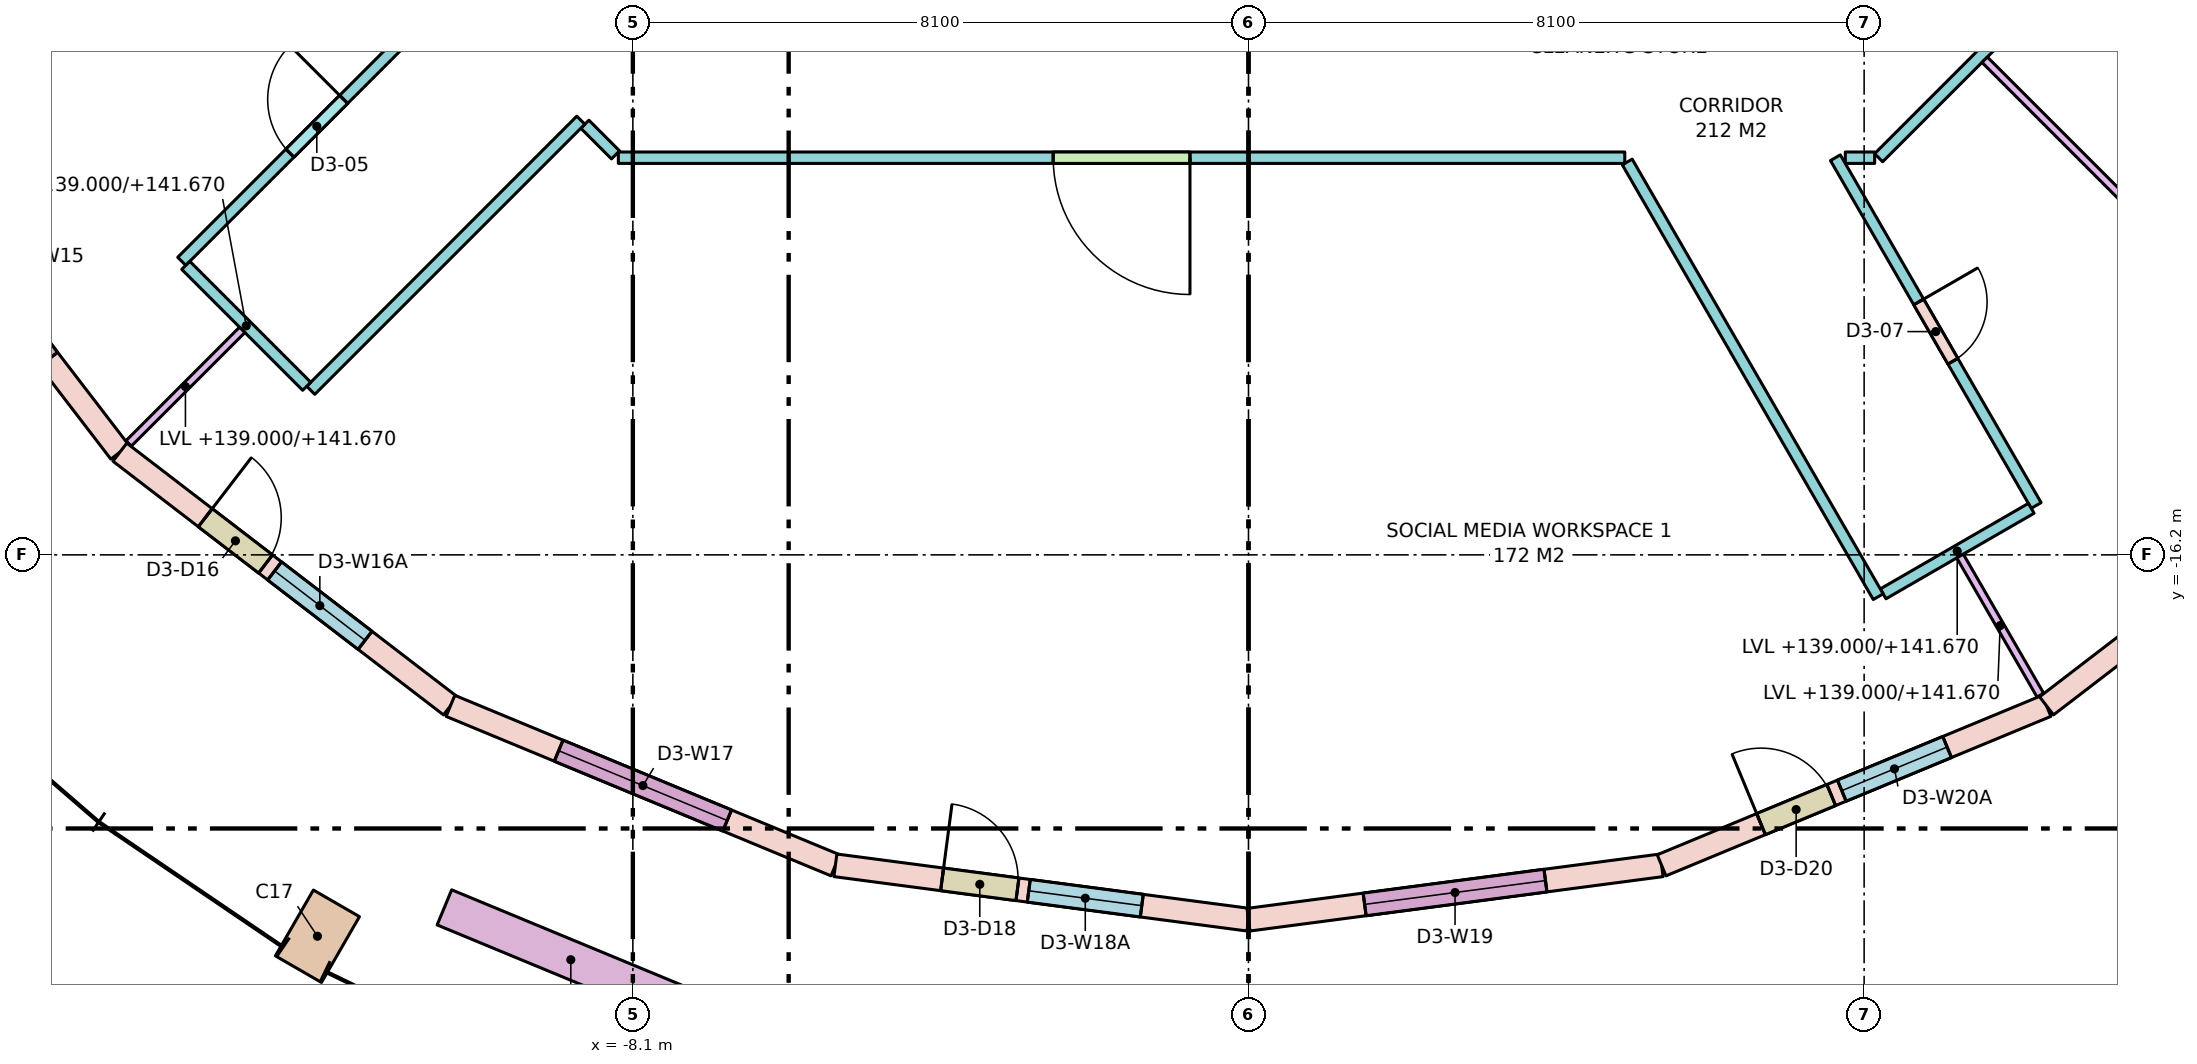
"""IFC4 building model, lengths in metres.
Left out: names, types, materials, properties, quantities, classifications, styles, units other than length and angle.
Written with IfcOpenShell. Run it as: python <this file> out.ifc"""

import sys

from ifc_helpers import new_model, si_unit, direction, frame, frame_2d, origin, origin_2d, place, context, subcontext, project, spatial, rectangle, extrude, element, fill, save


model = new_model("IFC4")
c1 = context("Model", 3, precision=1e-05, world=origin(), true_north=direction((0.0, 1.0)))
c2 = subcontext(c1, "Body", "Model", "MODEL_VIEW")
j1 = project(units=[si_unit("LENGTHUNIT", "METRE"), si_unit("PLANEANGLEUNIT", "RADIAN")], contexts=[c1])
p1 = place(None, origin())
s1 = spatial("IfcSite", under=j1, at=p1, CompositionType="ELEMENT")
p2 = place(p1, origin())
s2 = spatial("IfcBuilding", under=s1, at=p2, CompositionType="ELEMENT")
p3 = place(p2, frame((0.0, 0.0, 139.0)))
s3 = spatial("IfcBuildingStorey", under=s2, at=p3, CompositionType="ELEMENT", Elevation=139.0)
p4 = place(p3, frame((-12.25, -21.218, 0.0), z_axis=(0.0, 0.0, 1.0), x_axis=(0.866025403784, -0.5, 0.0)))
e1 = element("IfcColumn", 1, at=p4, inside=s3, PredefinedType="COLUMN", context=c2, shape_type="SweptSolid", body=[
    extrude(rectangle(XDim=0.7, YDim=1.0, at=origin_2d()), origin(), (0.0, 0.0, 1.0), 3.8),
])
p5 = place(p3, frame((-18.187, -10.5, 0.0), z_axis=(0.0, 0.0, 1.0), x_axis=(0.608784891166, -0.793335336593, 0.0)))
e2 = element("IfcWall", 2, at=p5, inside=s3, PredefinedType="STANDARD", context=c2, shape_type="SweptSolid", body=[
    extrude(rectangle(XDim=5.482, YDim=0.3, at=frame_2d((2.741, 0.0))), origin(), (0.0, 0.0, 1.0), 3.52),
])
p6 = place(p5, frame((1.541, 0.0, 0.8)))
e3 = element("IfcOpeningElement", 3, at=p6, cuts=e2, PredefinedType="OPENING", context=c2, shape_type="SweptSolid", body=[
    extrude(rectangle(XDim=2.4, YDim=2.5, at=frame_2d((1.2, 1.25))), frame((0.0, 0.16, 0.0), z_axis=(0.0, -1.0, 0.0), x_axis=(1.0, 0.0, 0.0)), (0.0, 0.0, 1.0), 0.32),
])
p7 = place(p3, frame((-14.849, -14.849, 0.0), z_axis=(0.0, 0.0, 1.0), x_axis=(0.793335336593, -0.608784891166, 0.0)))
e4 = element("IfcWall", 4, at=p7, inside=s3, PredefinedType="STANDARD", context=c2, shape_type="SweptSolid", body=[
    extrude(rectangle(XDim=5.482, YDim=0.3, at=frame_2d((2.741, 0.0))), origin(), (0.0, 0.0, 1.0), 3.52),
])
p8 = place(p7, frame((1.416, 0.0, 0.0)))
e5 = element("IfcOpeningElement", 5, at=p8, cuts=e4, PredefinedType="OPENING", context=c2, shape_type="SweptSolid", body=[
    extrude(rectangle(XDim=1.0, YDim=2.4, at=frame_2d((0.5, 1.2))), frame((0.0, 0.16, 0.0), z_axis=(0.0, -1.0, 0.0), x_axis=(1.0, 0.0, 0.0)), (0.0, 0.0, 1.0), 0.32),
])
p9 = place(p7, frame((2.566, 0.0, 0.8)))
e6 = element("IfcOpeningElement", 6, at=p9, cuts=e4, PredefinedType="OPENING", context=c2, shape_type="SweptSolid", body=[
    extrude(rectangle(XDim=1.5, YDim=2.5, at=frame_2d((0.75, 1.25))), frame((0.0, 0.16, 0.0), z_axis=(0.0, -1.0, 0.0), x_axis=(1.0, 0.0, 0.0)), (0.0, 0.0, 1.0), 0.32),
])
p10 = place(p3, frame((-10.5, -18.187, 0.0), z_axis=(0.0, 0.0, 1.0), x_axis=(0.923877333662, -0.382688740813, 0.0)))
e7 = element("IfcWall", 7, at=p10, inside=s3, PredefinedType="STANDARD", context=c2, shape_type="SweptSolid", body=[
    extrude(rectangle(XDim=5.482, YDim=0.3, at=frame_2d((2.741, 0.0))), origin(), (0.0, 0.0, 1.0), 3.52),
])
p11 = place(p10, frame((1.541, 0.0, 0.8)))
e8 = element("IfcOpeningElement", 8, at=p11, cuts=e7, PredefinedType="OPENING", context=c2, shape_type="SweptSolid", body=[
    extrude(rectangle(XDim=2.4, YDim=2.5, at=frame_2d((1.2, 1.25))), frame((0.0, 0.16, 0.0), z_axis=(0.0, -1.0, 0.0), x_axis=(1.0, 0.0, 0.0)), (0.0, 0.0, 1.0), 0.32),
])
p12 = place(p3, frame((-5.435, -20.284, 0.0), z_axis=(0.0, 0.0, 1.0), x_axis=(0.991444743541, -0.130527087244, 0.0)))
e9 = element("IfcWall", 9, at=p12, inside=s3, PredefinedType="STANDARD", context=c2, shape_type="SweptSolid", body=[
    extrude(rectangle(XDim=5.482, YDim=0.3, at=frame_2d((2.741, 0.0))), origin(), (0.0, 0.0, 1.0), 3.52),
])
p13 = place(p12, frame((1.416, 0.0, 0.0)))
e10 = element("IfcOpeningElement", 10, at=p13, cuts=e9, PredefinedType="OPENING", context=c2, shape_type="SweptSolid", body=[
    extrude(rectangle(XDim=1.0, YDim=2.4, at=frame_2d((0.5, 1.2))), frame((0.0, 0.16, 0.0), z_axis=(0.0, -1.0, 0.0), x_axis=(1.0, 0.0, 0.0)), (0.0, 0.0, 1.0), 0.32),
])
p14 = place(p12, frame((2.566, 0.0, 0.8)))
e11 = element("IfcOpeningElement", 11, at=p14, cuts=e9, PredefinedType="OPENING", context=c2, shape_type="SweptSolid", body=[
    extrude(rectangle(XDim=1.5, YDim=2.5, at=frame_2d((0.75, 1.25))), frame((0.0, 0.16, 0.0), z_axis=(0.0, -1.0, 0.0), x_axis=(1.0, 0.0, 0.0)), (0.0, 0.0, 1.0), 0.32),
])
p15 = place(p3, frame((0.0, -21.0, 0.0), z_axis=(0.0, 0.0, 1.0), x_axis=(0.991444743541, 0.130527087244, 0.0)))
e12 = element("IfcWall", 12, at=p15, inside=s3, PredefinedType="STANDARD", context=c2, shape_type="SweptSolid", body=[
    extrude(rectangle(XDim=5.482, YDim=0.3, at=frame_2d((2.741, 0.0))), origin(), (0.0, 0.0, 1.0), 3.52),
])
p16 = place(p15, frame((1.541, 0.0, 0.8)))
e13 = element("IfcOpeningElement", 13, at=p16, cuts=e12, PredefinedType="OPENING", context=c2, shape_type="SweptSolid", body=[
    extrude(rectangle(XDim=2.4, YDim=2.5, at=frame_2d((1.2, 1.25))), frame((0.0, 0.16, 0.0), z_axis=(0.0, -1.0, 0.0), x_axis=(1.0, 0.0, 0.0)), (0.0, 0.0, 1.0), 0.32),
])
p17 = place(p3, frame((5.435, -20.284, 0.0), z_axis=(0.0, 0.0, 1.0), x_axis=(0.923877333662, 0.382688740813, 0.0)))
e14 = element("IfcWall", 14, at=p17, inside=s3, PredefinedType="STANDARD", context=c2, shape_type="SweptSolid", body=[
    extrude(rectangle(XDim=5.482, YDim=0.3, at=frame_2d((2.741, 0.0))), origin(), (0.0, 0.0, 1.0), 3.52),
])
p18 = place(p17, frame((1.416, 0.0, 0.0)))
e15 = element("IfcOpeningElement", 15, at=p18, cuts=e14, PredefinedType="OPENING", context=c2, shape_type="SweptSolid", body=[
    extrude(rectangle(XDim=1.0, YDim=2.4, at=frame_2d((0.5, 1.2))), frame((0.0, 0.16, 0.0), z_axis=(0.0, -1.0, 0.0), x_axis=(1.0, 0.0, 0.0)), (0.0, 0.0, 1.0), 0.32),
])
p19 = place(p17, frame((2.566, 0.0, 0.8)))
e16 = element("IfcOpeningElement", 16, at=p19, cuts=e14, PredefinedType="OPENING", context=c2, shape_type="SweptSolid", body=[
    extrude(rectangle(XDim=1.5, YDim=2.5, at=frame_2d((0.75, 1.25))), frame((0.0, 0.16, 0.0), z_axis=(0.0, -1.0, 0.0), x_axis=(1.0, 0.0, 0.0)), (0.0, 0.0, 1.0), 0.32),
])
p20 = place(p3, frame((10.5, -18.187, 0.0), z_axis=(0.0, 0.0, 1.0), x_axis=(0.793335336593, 0.608784891166, 0.0)))
e17 = element("IfcWall", 17, at=p20, inside=s3, PredefinedType="STANDARD", context=c2, shape_type="SweptSolid", body=[
    extrude(rectangle(XDim=5.482, YDim=0.3, at=frame_2d((2.741, 0.0))), origin(), (0.0, 0.0, 1.0), 3.52),
])
p21 = place(p20, frame((1.541, 0.0, 0.8)))
e18 = element("IfcOpeningElement", 18, at=p21, cuts=e17, PredefinedType="OPENING", context=c2, shape_type="SweptSolid", body=[
    extrude(rectangle(XDim=2.4, YDim=2.5, at=frame_2d((1.2, 1.25))), frame((0.0, 0.16, 0.0), z_axis=(0.0, -1.0, 0.0), x_axis=(1.0, 0.0, 0.0)), (0.0, 0.0, 1.0), 0.32),
])
p22 = place(p3, frame((-10.58, -20.838, 0.0), z_axis=(0.0, 0.0, 1.0), x_axis=(0.923909393783, -0.382611332921, 0.0)))
e19 = element("IfcWall", 19, at=p22, inside=s3, PredefinedType="PARAPET", context=c2, shape_type="SweptSolid", body=[
    extrude(rectangle(XDim=3.6, YDim=0.5, at=frame_2d((1.8, 0.0))), origin(), (0.0, 0.0, 1.0), 0.9),
])
p23 = place(p3, frame((-14.035, -12.338, 0.0), z_axis=(0.0, 0.0, 1.0), x_axis=(0.707106781187, 0.707106781187, 0.0)))
e20 = element("IfcWall", 20, at=p23, inside=s3, PredefinedType="PARTITIONING", context=c2, shape_type="SweptSolid", body=[
    extrude(rectangle(XDim=5.026, YDim=0.15, at=frame_2d((2.513, 0.0))), origin(), (0.0, 0.0, 1.0), 3.52),
])
p24 = place(p23, frame((2.013, 0.0, 0.0)))
e21 = element("IfcOpeningElement", 21, at=p24, cuts=e20, PredefinedType="OPENING", context=c2, shape_type="SweptSolid", body=[
    extrude(rectangle(XDim=1.0, YDim=2.1, at=frame_2d((0.5, 1.05))), frame((0.0, 0.085, 0.0), z_axis=(0.0, -1.0, 0.0), x_axis=(1.0, 0.0, 0.0)), (0.0, 0.0, 1.0), 0.17),
])
p25 = place(p3, frame((12.938, -6.328, 0.0), z_axis=(0.0, 0.0, 1.0), x_axis=(-0.707088206597, -0.707125355289, 0.0)))
e22 = element("IfcWall", 22, at=p25, inside=s3, PredefinedType="PARTITIONING", context=c2, shape_type="SweptSolid", body=[
    extrude(rectangle(XDim=6.572, YDim=0.15, at=frame_2d((3.286, 0.0))), origin(), (0.0, 0.0, 1.0), 2.67),
])
p26 = place(p25, frame((2.398, 0.0, 0.0)))
e23 = element("IfcOpeningElement", 23, at=p26, cuts=e22, PredefinedType="OPENING", context=c2, shape_type="SweptSolid", body=[
    extrude(rectangle(XDim=0.9, YDim=2.1, at=frame_2d((0.45, 1.05))), frame((0.0, 0.085, 0.0), z_axis=(0.0, -1.0, 0.0), x_axis=(1.0, 0.0, 0.0)), (0.0, 0.0, 1.0), 0.17),
])
p27 = place(p3, frame((8.238, -10.975, 0.0), z_axis=(0.0, 0.0, 1.0), x_axis=(-1.0, 0.0, 0.0)))
e24 = element("IfcWall", 24, at=p27, inside=s3, PredefinedType="PARTITIONING", context=c2, shape_type="SweptSolid", body=[
    extrude(rectangle(XDim=0.386, YDim=0.15, at=frame_2d((0.193, 0.0))), origin(), (0.0, 0.0, 1.0), 3.52),
])
p28 = place(p3, frame((7.722, -10.975, 0.0), z_axis=(0.0, 0.0, 1.0), x_axis=(0.499981143329, -0.866036290415, 0.0)))
e25 = element("IfcWall", 25, at=p28, inside=s3, PredefinedType="PARTITIONING", context=c2, shape_type="SweptSolid", body=[
    extrude(rectangle(XDim=5.283, YDim=0.15, at=frame_2d((2.642, 0.0))), origin(), (0.0, 0.0, 1.0), 3.52),
])
p29 = place(p28, frame((2.191, 0.0, 0.0)))
e26 = element("IfcOpeningElement", 26, at=p29, cuts=e25, PredefinedType="OPENING", context=c2, shape_type="SweptSolid", body=[
    extrude(rectangle(XDim=0.9, YDim=2.1, at=frame_2d((0.45, 1.05))), frame((0.0, 0.085, 0.0), z_axis=(0.0, -1.0, 0.0), x_axis=(1.0, 0.0, 0.0)), (0.0, 0.0, 1.0), 0.17),
])
p30 = place(p3, frame((10.299, -15.588, 0.0), z_axis=(0.0, 0.0, 1.0), x_axis=(-0.866017533419, -0.500013631625, 0.0)))
e27 = element("IfcWall", 27, at=p30, inside=s3, PredefinedType="PARTITIONING", context=c2, shape_type="SweptSolid", body=[
    extrude(rectangle(XDim=2.25, YDim=0.15, at=frame_2d((1.125, 0.0))), origin(), (0.0, 0.0, 1.0), 2.67),
])
p31 = place(p3, frame((8.285, -16.75, 0.0), z_axis=(0.0, 0.0, 1.0), x_axis=(-0.499988075443, 0.866032288321, 0.0)))
e28 = element("IfcWall", 28, at=p31, inside=s3, PredefinedType="PARTITIONING", context=c2, shape_type="SweptSolid", body=[
    extrude(rectangle(XDim=6.604, YDim=0.15, at=frame_2d((3.302, 0.0))), origin(), (0.0, 0.0, 1.0), 3.52),
])
p32 = place(p3, frame((4.951, -10.975, 0.0), z_axis=(0.0, 0.0, 1.0), x_axis=(-1.0, 0.0, 0.0)))
e29 = element("IfcWall", 29, at=p32, inside=s3, PredefinedType="PARTITIONING", context=c2, shape_type="SweptSolid", body=[
    extrude(rectangle(XDim=13.242, YDim=0.15, at=frame_2d((6.621, 0.0))), origin(), (0.0, 0.0, 1.0), 2.67),
])
p33 = place(p32, frame((5.721, 0.0, 0.0)))
e30 = element("IfcOpeningElement", 30, at=p33, cuts=e29, PredefinedType="OPENING", context=c2, shape_type="SweptSolid", body=[
    extrude(rectangle(XDim=1.8, YDim=2.1, at=frame_2d((0.9, 1.05))), frame((0.0, 0.085, 0.0), z_axis=(0.0, -1.0, 0.0), x_axis=(1.0, 0.0, 0.0)), (0.0, 0.0, 1.0), 0.17),
])
p34 = place(p3, frame((-8.328, -10.938, 0.0), z_axis=(0.0, 0.0, 1.0), x_axis=(-0.707106781187, 0.707106781187, 0.0)))
e31 = element("IfcWall", 31, at=p34, inside=s3, PredefinedType="PARTITIONING", context=c2, shape_type="SweptSolid", body=[
    extrude(rectangle(XDim=0.571, YDim=0.15, at=frame_2d((0.285, 0.0))), origin(), (0.0, 0.0, 1.0), 3.52),
])
p35 = place(p3, frame((-8.784, -10.481, 0.0), z_axis=(0.0, 0.0, 1.0), x_axis=(-0.707106781187, -0.707106781187, 0.0)))
e32 = element("IfcWall", 32, at=p35, inside=s3, PredefinedType="PARTITIONING", context=c2, shape_type="SweptSolid", body=[
    extrude(rectangle(XDim=5.026, YDim=0.15, at=frame_2d((2.513, 0.0))), origin(), (0.0, 0.0, 1.0), 3.52),
])
p36 = place(p3, frame((-12.391, -13.982, 0.0), z_axis=(0.0, 0.0, 1.0), x_axis=(-0.707106781187, 0.707106781187, 0.0)))
e33 = element("IfcWall", 33, at=p36, inside=s3, PredefinedType="PARTITIONING", context=c2, shape_type="SweptSolid", body=[
    extrude(rectangle(XDim=2.25, YDim=0.15, at=frame_2d((1.125, 0.0))), origin(), (0.0, 0.0, 1.0), 2.67),
])
p37 = place(p3, frame((-13.24, -13.24, 0.0), z_axis=(0.0, 0.0, 1.0), x_axis=(-0.707106781187, -0.707106781187, 0.0)))
e34 = element("IfcWall", 34, at=p37, inside=s3, PredefinedType="PARTITIONING", context=c2, shape_type="SweptSolid", body=[
    extrude(rectangle(XDim=2.113, YDim=0.1, at=frame_2d((1.057, 0.0))), origin(), (0.0, 0.0, 1.0), 2.67),
])
p38 = place(p3, frame((9.362, -16.215, 0.0), z_axis=(0.0, 0.0, 1.0), x_axis=(0.500015802937, -0.866016279763, 0.0)))
e35 = element("IfcWall", 35, at=p38, inside=s3, PredefinedType="PARTITIONING", context=c2, shape_type="SweptSolid", body=[
    extrude(rectangle(XDim=2.113, YDim=0.1, at=frame_2d((1.057, 0.0))), origin(), (0.0, 0.0, 1.0), 2.67),
])
p39 = place(p3, frame((9.686, -9.686, 0.0), z_axis=(0.0, 0.0, 1.0), x_axis=(0.707106781187, -0.707106781187, 0.0)))
e36 = element("IfcWall", 36, at=p39, inside=s3, PredefinedType="PARTITIONING", context=c2, shape_type="SweptSolid", body=[
    extrude(rectangle(XDim=7.139, YDim=0.1, at=frame_2d((3.569, 0.0))), origin(), (0.0, 0.0, 1.0), 2.67),
])
p40 = place(p8, origin())
e37 = element("IfcDoor", 37, at=p40, inside=s3, OperationType="SINGLE_SWING_LEFT", PredefinedType="DOOR", context=c2, shape_type="SweptSolid", body=[
    extrude(rectangle(XDim=1.0, YDim=2.4, at=frame_2d((0.5, 1.2))), frame((0.0, 0.025, 0.0), z_axis=(0.0, -1.0, 0.0), x_axis=(1.0, 0.0, 0.0)), (0.0, 0.0, 1.0), 0.05),
])
fill(e5, e37)
p41 = place(p9, origin())
e38 = element("IfcWindow", 38, at=p41, inside=s3, PartitioningType="SINGLE_PANEL", PredefinedType="WINDOW", context=c2, shape_type="SweptSolid", body=[
    extrude(rectangle(XDim=1.5, YDim=2.5, at=frame_2d((0.75, 1.25))), frame((0.0, 0.03, 0.0), z_axis=(0.0, -1.0, 0.0), x_axis=(1.0, 0.0, 0.0)), (0.0, 0.0, 1.0), 0.06),
])
fill(e6, e38)
p42 = place(p11, origin())
e39 = element("IfcWindow", 39, at=p42, inside=s3, PartitioningType="SINGLE_PANEL", PredefinedType="WINDOW", context=c2, shape_type="SweptSolid", body=[
    extrude(rectangle(XDim=2.4, YDim=2.5, at=frame_2d((1.2, 1.25))), frame((0.0, 0.03, 0.0), z_axis=(0.0, -1.0, 0.0), x_axis=(1.0, 0.0, 0.0)), (0.0, 0.0, 1.0), 0.06),
])
fill(e8, e39)
p43 = place(p13, origin())
e40 = element("IfcDoor", 40, at=p43, inside=s3, OperationType="SINGLE_SWING_LEFT", PredefinedType="DOOR", context=c2, shape_type="SweptSolid", body=[
    extrude(rectangle(XDim=1.0, YDim=2.4, at=frame_2d((0.5, 1.2))), frame((0.0, 0.025, 0.0), z_axis=(0.0, -1.0, 0.0), x_axis=(1.0, 0.0, 0.0)), (0.0, 0.0, 1.0), 0.05),
])
fill(e10, e40)
p44 = place(p14, origin())
e41 = element("IfcWindow", 41, at=p44, inside=s3, PartitioningType="SINGLE_PANEL", PredefinedType="WINDOW", context=c2, shape_type="SweptSolid", body=[
    extrude(rectangle(XDim=1.5, YDim=2.5, at=frame_2d((0.75, 1.25))), frame((0.0, 0.03, 0.0), z_axis=(0.0, -1.0, 0.0), x_axis=(1.0, 0.0, 0.0)), (0.0, 0.0, 1.0), 0.06),
])
fill(e11, e41)
p45 = place(p16, origin())
e42 = element("IfcWindow", 42, at=p45, inside=s3, PartitioningType="SINGLE_PANEL", PredefinedType="WINDOW", context=c2, shape_type="SweptSolid", body=[
    extrude(rectangle(XDim=2.4, YDim=2.5, at=frame_2d((1.2, 1.25))), frame((0.0, 0.03, 0.0), z_axis=(0.0, -1.0, 0.0), x_axis=(1.0, 0.0, 0.0)), (0.0, 0.0, 1.0), 0.06),
])
fill(e13, e42)
p46 = place(p18, origin())
e43 = element("IfcDoor", 43, at=p46, inside=s3, OperationType="SINGLE_SWING_LEFT", PredefinedType="DOOR", context=c2, shape_type="SweptSolid", body=[
    extrude(rectangle(XDim=1.0, YDim=2.4, at=frame_2d((0.5, 1.2))), frame((0.0, 0.025, 0.0), z_axis=(0.0, -1.0, 0.0), x_axis=(1.0, 0.0, 0.0)), (0.0, 0.0, 1.0), 0.05),
])
fill(e15, e43)
p47 = place(p19, origin())
e44 = element("IfcWindow", 44, at=p47, inside=s3, PartitioningType="SINGLE_PANEL", PredefinedType="WINDOW", context=c2, shape_type="SweptSolid", body=[
    extrude(rectangle(XDim=1.5, YDim=2.5, at=frame_2d((0.75, 1.25))), frame((0.0, 0.03, 0.0), z_axis=(0.0, -1.0, 0.0), x_axis=(1.0, 0.0, 0.0)), (0.0, 0.0, 1.0), 0.06),
])
fill(e16, e44)
p48 = place(p24, origin())
e45 = element("IfcDoor", 45, at=p48, inside=s3, OperationType="SINGLE_SWING_RIGHT", PredefinedType="DOOR", context=c2, shape_type="SweptSolid", body=[
    extrude(rectangle(XDim=1.0, YDim=2.1, at=frame_2d((0.5, 1.05))), frame((0.0, 0.025, 0.0), z_axis=(0.0, -1.0, 0.0), x_axis=(1.0, 0.0, 0.0)), (0.0, 0.0, 1.0), 0.05),
])
fill(e21, e45)
p49 = place(p33, origin())
e46 = element("IfcDoor", 46, at=p49, inside=s3, OperationType="DOUBLE_DOOR_SINGLE_SWING", PredefinedType="DOOR", context=c2, shape_type="SweptSolid", body=[
    extrude(rectangle(XDim=1.8, YDim=2.1, at=frame_2d((0.9, 1.05))), frame((0.0, 0.025, 0.0), z_axis=(0.0, -1.0, 0.0), x_axis=(1.0, 0.0, 0.0)), (0.0, 0.0, 1.0), 0.05),
])
fill(e30, e46)
p50 = place(p29, origin())
e47 = element("IfcDoor", 47, at=p50, inside=s3, OperationType="SINGLE_SWING_LEFT", PredefinedType="DOOR", context=c2, shape_type="SweptSolid", body=[
    extrude(rectangle(XDim=0.9, YDim=2.1, at=frame_2d((0.45, 1.05))), frame((0.0, 0.025, 0.0), z_axis=(0.0, -1.0, 0.0), x_axis=(1.0, 0.0, 0.0)), (0.0, 0.0, 1.0), 0.05),
])
fill(e26, e47)
save(model, sys.argv[1])
